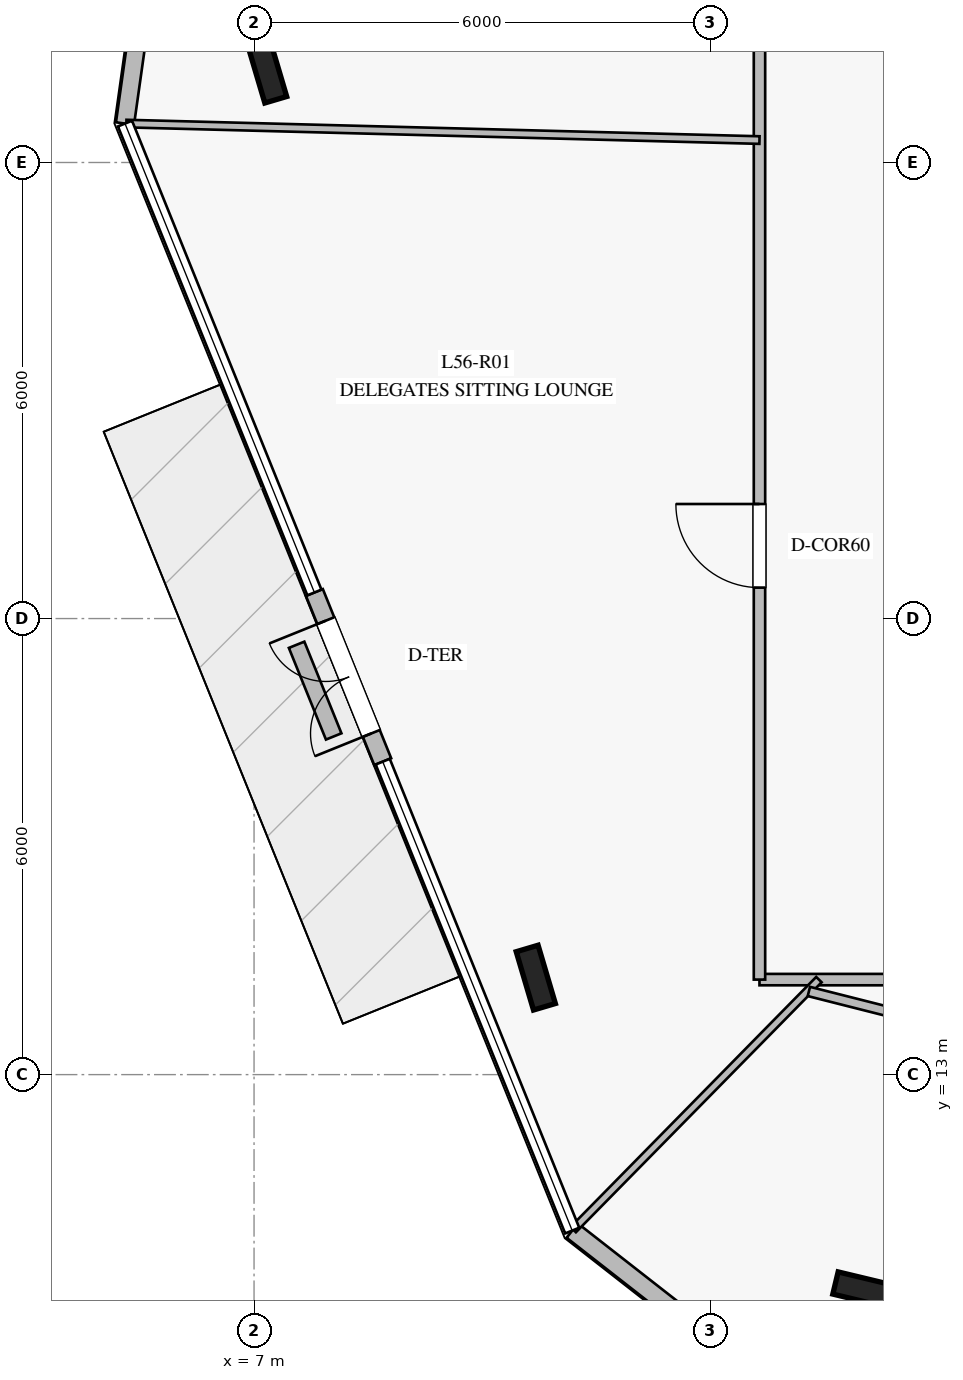
"""IFC4 building model, lengths in metres.
Left out: names, types, materials, properties, quantities, classifications, styles, units other than length and angle.
Written with IfcOpenShell. Run it as: python <this file> out.ifc"""

import sys

from ifc_helpers import new_model, si_unit, direction, frame, frame_2d, origin, origin_2d, place, context, subcontext, project, spatial, rectangle, i_section, extrude, element, fill, save


model = new_model("IFC4")
c1 = context("Model", 3, precision=1e-05, world=origin(), true_north=direction((0.0, 1.0)))
c2 = subcontext(c1, "Body", "Model", "MODEL_VIEW")
j1 = project(units=[si_unit("LENGTHUNIT", "METRE"), si_unit("PLANEANGLEUNIT", "RADIAN")], contexts=[c1])
p1 = place(None, origin())
s1 = spatial("IfcSite", under=j1, at=p1, CompositionType="ELEMENT")
p2 = place(p1, origin())
s2 = spatial("IfcBuilding", under=s1, at=p2, CompositionType="ELEMENT")
p3 = place(p2, frame((0.0, 0.0, 232.8)))
s3 = spatial("IfcBuildingStorey", under=s2, at=p3, CompositionType="ELEMENT", Elevation=232.8)
for number, where, z_axis, x_axis in (
    (1, (7.172, 26.209, 0.0), (0.0, 0.0, 1.0), (-0.284, 0.959, 0.0)),
    (2, (10.707, 14.276, 0.0), (0.0, 0.0, 1.0), (-0.284, 0.959, 0.0)),
    (3, (15.039, 10.165, 0.0), (0.0, 0.0, 1.0), (-0.972, 0.233, 0.0)),
):
    element("IfcColumn", number, at=place(p3, frame(where, z_axis=z_axis, x_axis=x_axis)), inside=s3, PredefinedType="COLUMN", context=c2, shape_type="SweptSolid", body=[
        extrude(i_section(OverallWidth=0.3, OverallDepth=0.8, WebThickness=0.018, FlangeThickness=0.033, at=origin_2d()), origin(), (0.0, 0.0, 1.0), 4.0),
    ])
p4 = place(p3, frame((5.925, 29.937, 0.0), z_axis=(0.0, 0.0, 1.0), x_axis=(-0.139424759628, -0.990232667812, 0.0)))
e4 = element("IfcWall", 4, at=p4, inside=s3, PredefinedType="STANDARD", context=c2, shape_type="SweptSolid", body=[
    extrude(rectangle(XDim=4.469, YDim=0.24, at=frame_2d((2.234, 0.0))), origin(), (0.0, 0.0, 1.0), 3.78),
])
p5 = place(p3, frame((7.794, 19.343, 0.0), z_axis=(0.0, 0.0, 1.0), x_axis=(0.374526940882, -0.9272160323, 0.0)))
e5 = element("IfcWall", 5, at=p5, inside=s3, PredefinedType="STANDARD", context=c2, shape_type="SweptSolid", body=[
    extrude(rectangle(XDim=2.401, YDim=0.24, at=frame_2d((1.2, 0.0))), origin(), (0.0, 0.0, 1.0), 3.78),
])
p6 = place(p5, frame((0.4, 0.0, 0.0)))
e6 = element("IfcOpeningElement", 6, at=p6, cuts=e5, PredefinedType="OPENING", context=c2, shape_type="SweptSolid", body=[
    extrude(rectangle(XDim=1.6, YDim=2.25, at=frame_2d((0.8, 1.125))), frame((0.0, 0.13, 0.0), z_axis=(0.0, -1.0, 0.0), x_axis=(1.0, 0.0, 0.0)), (0.0, 0.0, 1.0), 0.26),
])
p7 = place(p3, frame((11.186, 10.948, 0.0), z_axis=(0.0, 0.0, 1.0), x_axis=(0.788002835757, -0.615671609577, 0.0)))
e7 = element("IfcWall", 7, at=p7, inside=s3, PredefinedType="STANDARD", context=c2, shape_type="SweptSolid", body=[
    extrude(rectangle(XDim=4.468, YDim=0.24, at=frame_2d((2.234, 0.0))), origin(), (0.0, 0.0, 1.0), 3.78),
])
p8 = place(p3, frame((7.56, 18.655, 0.0), z_axis=(0.0, 0.0, 1.0), x_axis=(0.375108300877, -0.926980993663, 0.0)))
e8 = element("IfcWall", 8, at=p8, inside=s3, PredefinedType="USERDEFINED", context=c2, shape_type="SweptSolid", body=[
    extrude(rectangle(XDim=1.301, YDim=0.22, at=frame_2d((0.65, 0.0))), origin(), (0.0, 0.0, 1.0), 0.4),
])
p9 = place(p3, frame((36.35, 14.25, 0.0), z_axis=(0.0, 0.0, 1.0), x_axis=(-1.0, 0.0, 0.0)))
e9 = element("IfcWall", 9, at=p9, inside=s3, PredefinedType="PARTITIONING", context=c2, shape_type="SweptSolid", body=[
    extrude(rectangle(XDim=22.7, YDim=0.15, at=frame_2d((11.35, 0.0))), origin(), (0.0, 0.0, 1.0), 3.05),
])
p10 = place(p9, frame((14.621, 0.0, 0.0)))
e10 = element("IfcOpeningElement", 10, at=p10, cuts=e9, PredefinedType="OPENING", context=c2, shape_type="SweptSolid", body=[
    extrude(rectangle(XDim=1.1, YDim=2.2, at=frame_2d((0.55, 1.1))), frame((0.0, 0.085, 0.0), z_axis=(0.0, -1.0, 0.0), x_axis=(1.0, 0.0, 0.0)), (0.0, 0.0, 1.0), 0.17),
])
p11 = place(p3, frame((13.65, 14.25, 0.0), z_axis=(0.0, 0.0, 1.0), x_axis=(0.0, 1.0, 0.0)))
e11 = element("IfcWall", 11, at=p11, inside=s3, PredefinedType="PARTITIONING", context=c2, shape_type="SweptSolid", body=[
    extrude(rectangle(XDim=21.5, YDim=0.15, at=frame_2d((10.75, 0.0))), origin(), (0.0, 0.0, 1.0), 3.05),
])
p12 = place(p11, frame((5.157, 0.0, 0.0)))
e12 = element("IfcOpeningElement", 12, at=p12, cuts=e11, PredefinedType="OPENING", context=c2, shape_type="SweptSolid", body=[
    extrude(rectangle(XDim=1.1, YDim=2.2, at=frame_2d((0.55, 1.1))), frame((0.0, 0.085, 0.0), z_axis=(0.0, -1.0, 0.0), x_axis=(1.0, 0.0, 0.0)), (0.0, 0.0, 1.0), 0.17),
])
p13 = place(p3, frame((13.65, 25.295, 0.0), z_axis=(0.0, 0.0, 1.0), x_axis=(-0.99966071874, 0.026047023036, 0.0)))
e13 = element("IfcWall", 13, at=p13, inside=s3, PredefinedType="MOVABLE", context=c2, shape_type="SweptSolid", body=[
    extrude(rectangle(XDim=8.333, YDim=0.1, at=frame_2d((4.167, 0.0))), origin(), (0.0, 0.0, 1.0), 3.18),
])
p14 = place(p3, frame((14.432, 14.25, 0.0), z_axis=(0.0, 0.0, 1.0), x_axis=(-0.700992810531, -0.713168338882, 0.0)))
e14 = element("IfcWall", 14, at=p14, inside=s3, PredefinedType="MOVABLE", context=c2, shape_type="SweptSolid", body=[
    extrude(rectangle(XDim=4.612, YDim=0.1, at=frame_2d((2.306, 0.0))), origin(), (0.0, 0.0, 1.0), 3.18),
])
p15 = place(p3, frame((14.3, 14.094, 0.0), z_axis=(0.0, 0.0, 1.0), x_axis=(0.969369895499, -0.245605386139, 0.0)))
e15 = element("IfcWall", 15, at=p15, inside=s3, PredefinedType="PARTITIONING", context=c2, shape_type="SweptSolid", body=[
    extrude(rectangle(XDim=15.208, YDim=0.125, at=frame_2d((7.604, 0.0))), origin(), (0.0, 0.0, 1.0), 3.28),
])
p16 = place(p15, frame((7.104, 0.0, 0.0)))
e16 = element("IfcOpeningElement", 16, at=p16, cuts=e15, PredefinedType="OPENING", context=c2, shape_type="SweptSolid", body=[
    extrude(rectangle(XDim=1.0, YDim=2.15, at=frame_2d((0.5, 1.075))), frame((0.0, 0.073, 0.0), z_axis=(0.0, -1.0, 0.0), x_axis=(1.0, 0.0, 0.0)), (0.0, 0.0, 1.0), 0.145),
])
p17 = place(p6, frame((1.6, 0.0, 0.0), z_axis=(0.0, 0.0, 1.0), x_axis=(-1.0, 0.0, 0.0)))
e17 = element("IfcDoor", 17, at=p17, inside=s3, OperationType="DOUBLE_DOOR_SINGLE_SWING", PredefinedType="DOOR", context=c2, shape_type="SweptSolid", body=[
    extrude(rectangle(XDim=1.6, YDim=2.25, at=frame_2d((0.8, 1.125))), frame((0.0, 0.025, 0.0), z_axis=(0.0, -1.0, 0.0), x_axis=(1.0, 0.0, 0.0)), (0.0, 0.0, 1.0), 0.05),
])
fill(e6, e17)
p18 = place(p12, origin())
e18 = element("IfcDoor", 18, at=p18, inside=s3, OperationType="SINGLE_SWING_RIGHT", PredefinedType="DOOR", context=c2, shape_type="SweptSolid", body=[
    extrude(rectangle(XDim=1.1, YDim=2.2, at=frame_2d((0.55, 1.1))), frame((0.0, 0.025, 0.0), z_axis=(0.0, -1.0, 0.0), x_axis=(1.0, 0.0, 0.0)), (0.0, 0.0, 1.0), 0.05),
])
fill(e12, e18)
save(model, sys.argv[1])
